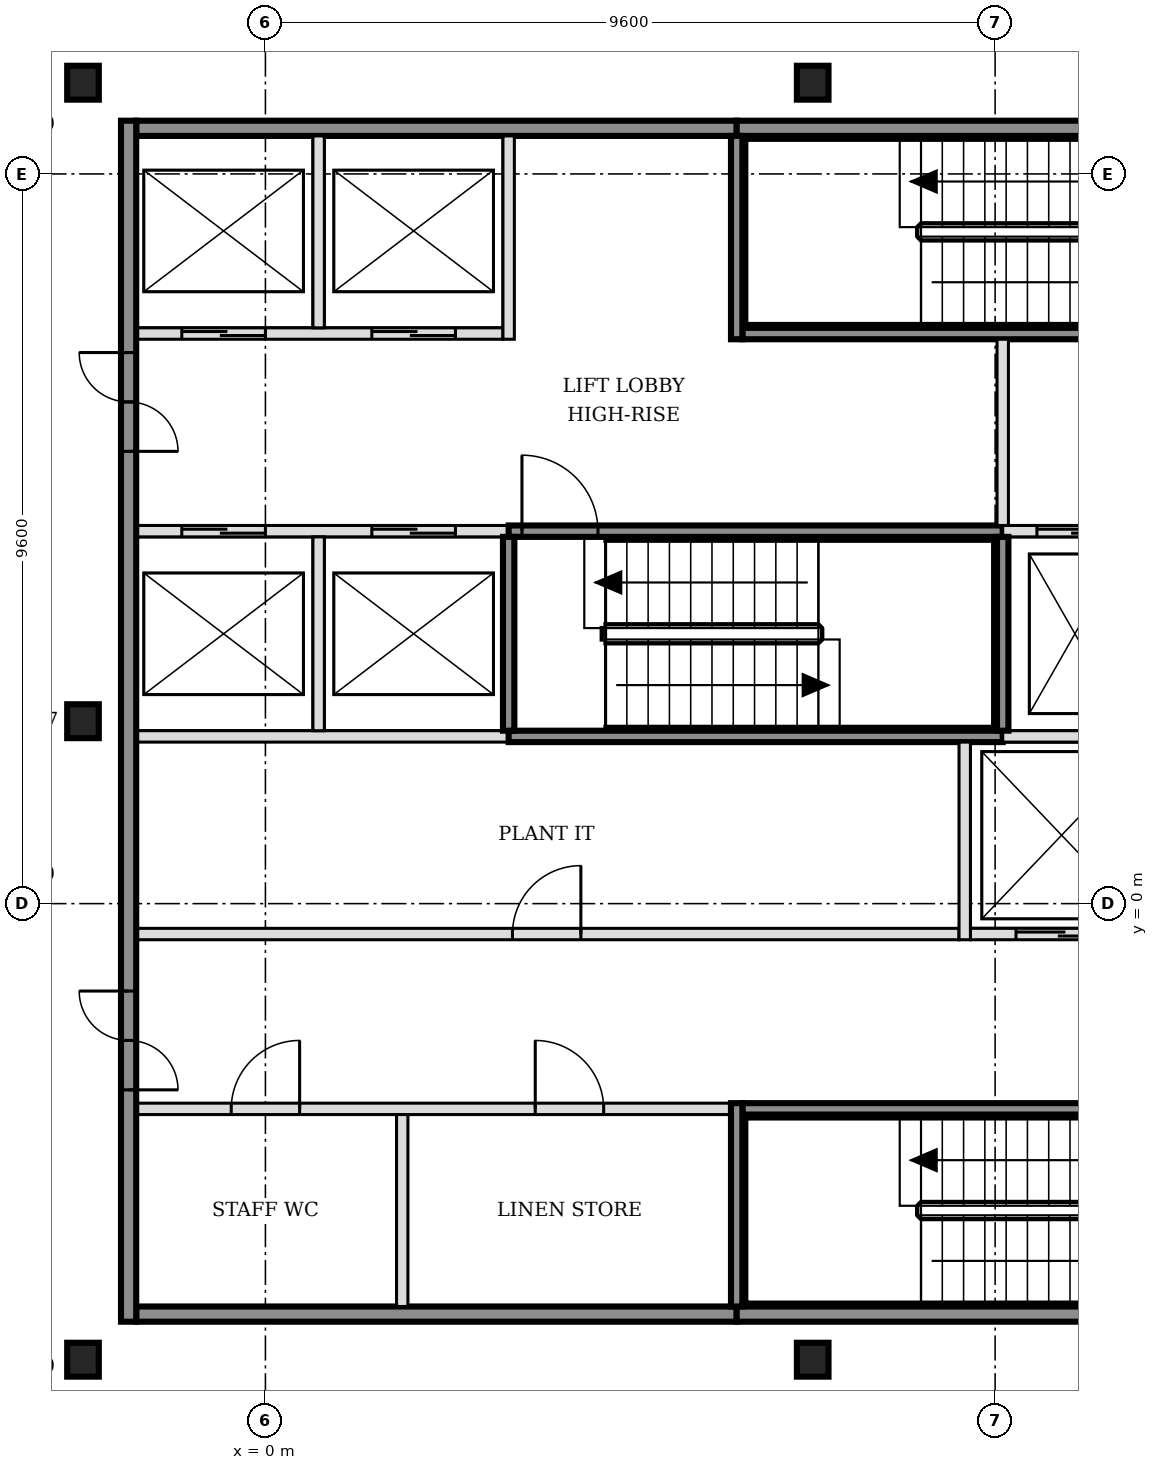
"""IFC4 building model, lengths in metres.
Left out: names, types, materials, properties, quantities, classifications, styles, units other than length and angle.
Written with IfcOpenShell. Run it as: python <this file> out.ifc"""

import sys

from ifc_helpers import new_model, si_unit, direction, frame, frame_2d, origin, origin_2d, place, context, subcontext, project, spatial, rectangle, i_section, extrude, element, fill, save


model = new_model("IFC4")
c1 = context("Model", 3, precision=1e-05, world=origin(), true_north=direction((0.0, 1.0)))
c2 = subcontext(c1, "Body", "Model", "MODEL_VIEW")
j1 = project(units=[si_unit("LENGTHUNIT", "METRE"), si_unit("PLANEANGLEUNIT", "RADIAN")], contexts=[c1])
p1 = place(None, origin())
s1 = spatial("IfcSite", under=j1, at=p1, CompositionType="ELEMENT")
p2 = place(p1, origin())
s2 = spatial("IfcBuilding", under=s1, at=p2, CompositionType="ELEMENT")
p3 = place(p2, frame((0.0, 0.0, 172.2)))
s3 = spatial("IfcBuildingStorey", under=s2, at=p3, CompositionType="ELEMENT", Elevation=172.2)
for number, where, z_axis, x_axis in (
    (1, (-2.4, -6.0, -0.15), (0.0, 0.0, 1.0), (1.0, 0.0, 0.0)),
    (2, (7.2, -6.0, -0.15), (0.0, 0.0, 1.0), (1.0, 0.0, 0.0)),
    (3, (-2.4, 2.4, -0.15), (0.0, 0.0, 1.0), (1.0, 0.0, 0.0)),
    (4, (-2.4, 10.8, -0.15), (0.0, 0.0, 1.0), (1.0, 0.0, 0.0)),
    (5, (7.2, 10.8, -0.15), (0.0, 0.0, 1.0), (1.0, 0.0, 0.0)),
):
    element("IfcColumn", number, at=place(p3, frame(where, z_axis=z_axis, x_axis=x_axis)), inside=s3, PredefinedType="COLUMN", context=c2, shape_type="SweptSolid", body=[
        extrude(i_section(OverallWidth=0.416, OverallDepth=0.446, WebThickness=0.039, FlangeThickness=0.063, FilletRadius=0.015, at=origin_2d()), origin(), (0.0, 0.0, 1.0), 3.6),
    ])
p4 = place(p3, frame((-1.7, -5.4, 0.0), z_axis=(0.0, 0.0, 1.0), x_axis=(1.0, 0.0, 0.0)))
e6 = element("IfcWall", 6, at=p4, inside=s3, PredefinedType="SOLIDWALL", context=c2, shape_type="SweptSolid", body=[
    extrude(rectangle(XDim=7.9, YDim=0.2, at=frame_2d((3.95, 0.0))), origin(), (0.0, 0.0, 1.0), 3.45),
])
p5 = place(p3, frame((6.2, -5.4, 0.0), z_axis=(0.0, 0.0, 1.0), x_axis=(1.0, 0.0, 0.0)))
e7 = element("IfcWall", 7, at=p5, inside=s3, PredefinedType="SOLIDWALL", context=c2, shape_type="SweptSolid", body=[
    extrude(rectangle(XDim=6.5, YDim=0.2, at=frame_2d((3.25, 0.0))), origin(), (0.0, 0.0, 1.0), 3.45),
])
p6 = place(p3, frame((-1.7, -2.7, 0.0), z_axis=(0.0, 0.0, 1.0), x_axis=(1.0, 0.0, 0.0)))
e8 = element("IfcWall", 8, at=p6, inside=s3, PredefinedType="PARTITIONING", context=c2, shape_type="SweptSolid", body=[
    extrude(rectangle(XDim=7.825, YDim=0.15, at=frame_2d((3.913, 0.0))), origin(), (0.0, 0.0, 1.0), 3.45),
])
p7 = place(p6, frame((1.25, 0.0, 0.0)))
e9 = element("IfcOpeningElement", 9, at=p7, cuts=e8, PredefinedType="OPENING", context=c2, shape_type="SweptSolid", body=[
    extrude(rectangle(XDim=0.9, YDim=2.1, at=frame_2d((0.45, 1.05))), frame((0.0, 0.085, 0.0), z_axis=(0.0, -1.0, 0.0), x_axis=(1.0, 0.0, 0.0)), (0.0, 0.0, 1.0), 0.17),
])
p8 = place(p6, frame((5.25, 0.0, 0.0)))
e10 = element("IfcOpeningElement", 10, at=p8, cuts=e8, PredefinedType="OPENING", context=c2, shape_type="SweptSolid", body=[
    extrude(rectangle(XDim=0.9, YDim=2.1, at=frame_2d((0.45, 1.05))), frame((0.0, 0.085, 0.0), z_axis=(0.0, -1.0, 0.0), x_axis=(1.0, 0.0, 0.0)), (0.0, 0.0, 1.0), 0.17),
])
p9 = place(p3, frame((6.275, -2.7, 0.0), z_axis=(0.0, 0.0, 1.0), x_axis=(1.0, 0.0, 0.0)))
e11 = element("IfcWall", 11, at=p9, inside=s3, PredefinedType="SOLIDWALL", context=c2, shape_type="SweptSolid", body=[
    extrude(rectangle(XDim=6.35, YDim=0.15, at=frame_2d((3.175, 0.0))), origin(), (0.0, 0.0, 1.0), 3.45),
])
p10 = place(p9, frame((5.225, 0.0, 0.0)))
e12 = element("IfcOpeningElement", 12, at=p10, cuts=e11, PredefinedType="OPENING", context=c2, shape_type="SweptSolid", body=[
    extrude(rectangle(XDim=1.0, YDim=2.1, at=frame_2d((0.5, 1.05))), frame((0.0, 0.085, 0.0), z_axis=(0.0, -1.0, 0.0), x_axis=(1.0, 0.0, 0.0)), (0.0, 0.0, 1.0), 0.17),
])
p11 = place(p3, frame((-1.7, -0.4, 0.0), z_axis=(0.0, 0.0, 1.0), x_axis=(1.0, 0.0, 0.0)))
e13 = element("IfcWall", 13, at=p11, inside=s3, PredefinedType="PARTITIONING", context=c2, shape_type="SweptSolid", body=[
    extrude(rectangle(XDim=10.825, YDim=0.15, at=frame_2d((5.413, 0.0))), origin(), (0.0, 0.0, 1.0), 3.45),
])
p12 = place(p11, frame((4.95, 0.0, 0.0)))
e14 = element("IfcOpeningElement", 14, at=p12, cuts=e13, PredefinedType="OPENING", context=c2, shape_type="SweptSolid", body=[
    extrude(rectangle(XDim=0.9, YDim=2.1, at=frame_2d((0.45, 1.05))), frame((0.0, 0.085, 0.0), z_axis=(0.0, -1.0, 0.0), x_axis=(1.0, 0.0, 0.0)), (0.0, 0.0, 1.0), 0.17),
])
p13 = place(p3, frame((9.275, -0.4, 0.0), z_axis=(0.0, 0.0, 1.0), x_axis=(1.0, 0.0, 0.0)))
e15 = element("IfcWall", 15, at=p13, inside=s3, PredefinedType="SOLIDWALL", context=c2, shape_type="SweptSolid", body=[
    extrude(rectangle(XDim=4.95, YDim=0.15, at=frame_2d((2.475, 0.0))), origin(), (0.0, 0.0, 1.0), 3.45),
])
p14 = place(p13, frame((0.6, 0.0, 0.0)))
e16 = element("IfcOpeningElement", 16, at=p14, cuts=e15, PredefinedType="OPENING", context=c2, shape_type="SweptSolid", body=[
    extrude(rectangle(XDim=1.2, YDim=2.1, at=frame_2d((0.6, 1.05))), frame((0.0, 0.085, 0.0), z_axis=(0.0, -1.0, 0.0), x_axis=(1.0, 0.0, 0.0)), (0.0, 0.0, 1.0), 0.17),
])
p15 = place(p13, frame((3.15, 0.0, 0.0)))
e17 = element("IfcOpeningElement", 17, at=p15, cuts=e15, PredefinedType="OPENING", context=c2, shape_type="SweptSolid", body=[
    extrude(rectangle(XDim=1.2, YDim=2.1, at=frame_2d((0.6, 1.05))), frame((0.0, 0.085, 0.0), z_axis=(0.0, -1.0, 0.0), x_axis=(1.0, 0.0, 0.0)), (0.0, 0.0, 1.0), 0.17),
])
p16 = place(p3, frame((-1.7, 2.2, 0.0), z_axis=(0.0, 0.0, 1.0), x_axis=(1.0, 0.0, 0.0)))
e18 = element("IfcWall", 18, at=p16, inside=s3, PredefinedType="SOLIDWALL", context=c2, shape_type="SweptSolid", body=[
    extrude(rectangle(XDim=4.9, YDim=0.15, at=frame_2d((2.45, 0.0))), origin(), (0.0, 0.0, 1.0), 3.45),
])
p17 = place(p3, frame((3.2, 2.2, 0.0), z_axis=(0.0, 0.0, 1.0), x_axis=(1.0, 0.0, 0.0)))
e19 = element("IfcWall", 19, at=p17, inside=s3, PredefinedType="SOLIDWALL", context=c2, shape_type="SweptSolid", body=[
    extrude(rectangle(XDim=6.5, YDim=0.15, at=frame_2d((3.25, 0.0))), origin(), (0.0, 0.0, 1.0), 3.45),
])
p18 = place(p3, frame((9.7, 2.2, 0.0), z_axis=(0.0, 0.0, 1.0), x_axis=(1.0, 0.0, 0.0)))
e20 = element("IfcWall", 20, at=p18, inside=s3, PredefinedType="SOLIDWALL", context=c2, shape_type="SweptSolid", body=[
    extrude(rectangle(XDim=4.525, YDim=0.15, at=frame_2d((2.263, 0.0))), origin(), (0.0, 0.0, 1.0), 3.45),
])
p19 = place(p3, frame((-1.7, 4.9, 0.0), z_axis=(0.0, 0.0, 1.0), x_axis=(1.0, 0.0, 0.0)))
e21 = element("IfcWall", 21, at=p19, inside=s3, PredefinedType="SOLIDWALL", context=c2, shape_type="SweptSolid", body=[
    extrude(rectangle(XDim=4.9, YDim=0.15, at=frame_2d((2.45, 0.0))), origin(), (0.0, 0.0, 1.0), 3.45),
])
p20 = place(p19, frame((0.6, 0.0, 0.0)))
e22 = element("IfcOpeningElement", 22, at=p20, cuts=e21, PredefinedType="OPENING", context=c2, shape_type="SweptSolid", body=[
    extrude(rectangle(XDim=1.1, YDim=2.1, at=frame_2d((0.55, 1.05))), frame((0.0, 0.085, 0.0), z_axis=(0.0, -1.0, 0.0), x_axis=(1.0, 0.0, 0.0)), (0.0, 0.0, 1.0), 0.17),
])
p21 = place(p19, frame((3.1, 0.0, 0.0)))
e23 = element("IfcOpeningElement", 23, at=p21, cuts=e21, PredefinedType="OPENING", context=c2, shape_type="SweptSolid", body=[
    extrude(rectangle(XDim=1.1, YDim=2.1, at=frame_2d((0.55, 1.05))), frame((0.0, 0.085, 0.0), z_axis=(0.0, -1.0, 0.0), x_axis=(1.0, 0.0, 0.0)), (0.0, 0.0, 1.0), 0.17),
])
p22 = place(p3, frame((3.2, 4.9, 0.0), z_axis=(0.0, 0.0, 1.0), x_axis=(1.0, 0.0, 0.0)))
e24 = element("IfcWall", 24, at=p22, inside=s3, PredefinedType="SOLIDWALL", context=c2, shape_type="SweptSolid", body=[
    extrude(rectangle(XDim=6.5, YDim=0.15, at=frame_2d((3.25, 0.0))), origin(), (0.0, 0.0, 1.0), 3.45),
])
p23 = place(p22, frame((0.175, 0.0, 0.0)))
e25 = element("IfcOpeningElement", 25, at=p23, cuts=e24, PredefinedType="OPENING", context=c2, shape_type="SweptSolid", body=[
    extrude(rectangle(XDim=1.0, YDim=2.1, at=frame_2d((0.5, 1.05))), frame((0.0, 0.085, 0.0), z_axis=(0.0, -1.0, 0.0), x_axis=(1.0, 0.0, 0.0)), (0.0, 0.0, 1.0), 0.17),
])
p24 = place(p3, frame((9.7, 4.9, 0.0), z_axis=(0.0, 0.0, 1.0), x_axis=(1.0, 0.0, 0.0)))
e26 = element("IfcWall", 26, at=p24, inside=s3, PredefinedType="SOLIDWALL", context=c2, shape_type="SweptSolid", body=[
    extrude(rectangle(XDim=6.4, YDim=0.15, at=frame_2d((3.2, 0.0))), origin(), (0.0, 0.0, 1.0), 3.45),
])
p25 = place(p24, frame((0.45, 0.0, 0.0)))
e27 = element("IfcOpeningElement", 27, at=p25, cuts=e26, PredefinedType="OPENING", context=c2, shape_type="SweptSolid", body=[
    extrude(rectangle(XDim=1.0, YDim=2.1, at=frame_2d((0.5, 1.05))), frame((0.0, 0.085, 0.0), z_axis=(0.0, -1.0, 0.0), x_axis=(1.0, 0.0, 0.0)), (0.0, 0.0, 1.0), 0.17),
])
p26 = place(p24, frame((2.35, 0.0, 0.0)))
e28 = element("IfcOpeningElement", 28, at=p26, cuts=e26, PredefinedType="OPENING", context=c2, shape_type="SweptSolid", body=[
    extrude(rectangle(XDim=1.0, YDim=2.1, at=frame_2d((0.5, 1.05))), frame((0.0, 0.085, 0.0), z_axis=(0.0, -1.0, 0.0), x_axis=(1.0, 0.0, 0.0)), (0.0, 0.0, 1.0), 0.17),
])
p27 = place(p24, frame((4.7, 0.0, 0.0)))
e29 = element("IfcOpeningElement", 29, at=p27, cuts=e26, PredefinedType="OPENING", context=c2, shape_type="SweptSolid", body=[
    extrude(rectangle(XDim=0.9, YDim=2.1, at=frame_2d((0.45, 1.05))), frame((0.0, 0.085, 0.0), z_axis=(0.0, -1.0, 0.0), x_axis=(1.0, 0.0, 0.0)), (0.0, 0.0, 1.0), 0.17),
])
p28 = place(p3, frame((-1.7, 7.5, 0.0), z_axis=(0.0, 0.0, 1.0), x_axis=(1.0, 0.0, 0.0)))
e30 = element("IfcWall", 30, at=p28, inside=s3, PredefinedType="SOLIDWALL", context=c2, shape_type="SweptSolid", body=[
    extrude(rectangle(XDim=4.825, YDim=0.15, at=frame_2d((2.413, 0.0))), origin(), (0.0, 0.0, 1.0), 3.45),
])
p29 = place(p28, frame((0.6, 0.0, 0.0)))
e31 = element("IfcOpeningElement", 31, at=p29, cuts=e30, PredefinedType="OPENING", context=c2, shape_type="SweptSolid", body=[
    extrude(rectangle(XDim=1.1, YDim=2.1, at=frame_2d((0.55, 1.05))), frame((0.0, 0.085, 0.0), z_axis=(0.0, -1.0, 0.0), x_axis=(1.0, 0.0, 0.0)), (0.0, 0.0, 1.0), 0.17),
])
p30 = place(p28, frame((3.1, 0.0, 0.0)))
e32 = element("IfcOpeningElement", 32, at=p30, cuts=e30, PredefinedType="OPENING", context=c2, shape_type="SweptSolid", body=[
    extrude(rectangle(XDim=1.1, YDim=2.1, at=frame_2d((0.55, 1.05))), frame((0.0, 0.085, 0.0), z_axis=(0.0, -1.0, 0.0), x_axis=(1.0, 0.0, 0.0)), (0.0, 0.0, 1.0), 0.17),
])
p31 = place(p3, frame((6.275, 7.5, 0.0), z_axis=(0.0, 0.0, 1.0), x_axis=(1.0, 0.0, 0.0)))
e33 = element("IfcWall", 33, at=p31, inside=s3, PredefinedType="SOLIDWALL", context=c2, shape_type="SweptSolid", body=[
    extrude(rectangle(XDim=6.425, YDim=0.15, at=frame_2d((3.212, 0.0))), origin(), (0.0, 0.0, 1.0), 3.45),
])
p32 = place(p31, frame((5.225, 0.0, 0.0)))
e34 = element("IfcOpeningElement", 34, at=p32, cuts=e33, PredefinedType="OPENING", context=c2, shape_type="SweptSolid", body=[
    extrude(rectangle(XDim=1.0, YDim=2.1, at=frame_2d((0.5, 1.05))), frame((0.0, 0.085, 0.0), z_axis=(0.0, -1.0, 0.0), x_axis=(1.0, 0.0, 0.0)), (0.0, 0.0, 1.0), 0.17),
])
p33 = place(p3, frame((-1.7, 10.2, 0.0), z_axis=(0.0, 0.0, 1.0), x_axis=(1.0, 0.0, 0.0)))
e35 = element("IfcWall", 35, at=p33, inside=s3, PredefinedType="SOLIDWALL", context=c2, shape_type="SweptSolid", body=[
    extrude(rectangle(XDim=7.9, YDim=0.2, at=frame_2d((3.95, 0.0))), origin(), (0.0, 0.0, 1.0), 3.45),
])
p34 = place(p3, frame((6.2, 10.2, 0.0), z_axis=(0.0, 0.0, 1.0), x_axis=(1.0, 0.0, 0.0)))
e36 = element("IfcWall", 36, at=p34, inside=s3, PredefinedType="SOLIDWALL", context=c2, shape_type="SweptSolid", body=[
    extrude(rectangle(XDim=6.5, YDim=0.2, at=frame_2d((3.25, 0.0))), origin(), (0.0, 0.0, 1.0), 3.45),
])
p35 = place(p3, frame((-1.8, -5.5, 0.0), z_axis=(0.0, 0.0, 1.0), x_axis=(0.0, 1.0, 0.0)))
e37 = element("IfcWall", 37, at=p35, inside=s3, PredefinedType="SOLIDWALL", context=c2, shape_type="SweptSolid", body=[
    extrude(rectangle(XDim=15.8, YDim=0.2, at=frame_2d((7.9, 0.0))), origin(), (0.0, 0.0, 1.0), 3.45),
])
p36 = place(p35, frame((3.05, 0.0, 0.0)))
e38 = element("IfcOpeningElement", 38, at=p36, cuts=e37, PredefinedType="OPENING", context=c2, shape_type="SweptSolid", body=[
    extrude(rectangle(XDim=1.3, YDim=2.1, at=frame_2d((0.65, 1.05))), frame((0.0, 0.11, 0.0), z_axis=(0.0, -1.0, 0.0), x_axis=(1.0, 0.0, 0.0)), (0.0, 0.0, 1.0), 0.22),
])
p37 = place(p35, frame((11.45, 0.0, 0.0)))
e39 = element("IfcOpeningElement", 39, at=p37, cuts=e37, PredefinedType="OPENING", context=c2, shape_type="SweptSolid", body=[
    extrude(rectangle(XDim=1.3, YDim=2.1, at=frame_2d((0.65, 1.05))), frame((0.0, 0.11, 0.0), z_axis=(0.0, -1.0, 0.0), x_axis=(1.0, 0.0, 0.0)), (0.0, 0.0, 1.0), 0.22),
])
p38 = place(p3, frame((0.7, 2.275, 0.0), z_axis=(0.0, 0.0, 1.0), x_axis=(0.0, 1.0, 0.0)))
e40 = element("IfcWall", 40, at=p38, inside=s3, PredefinedType="SOLIDWALL", context=c2, shape_type="SweptSolid", body=[
    extrude(rectangle(XDim=2.55, YDim=0.15, at=frame_2d((1.275, 0.0))), origin(), (0.0, 0.0, 1.0), 3.45),
])
p39 = place(p3, frame((0.7, 7.575, 0.0), z_axis=(0.0, 0.0, 1.0), x_axis=(0.0, 1.0, 0.0)))
e41 = element("IfcWall", 41, at=p39, inside=s3, PredefinedType="SOLIDWALL", context=c2, shape_type="SweptSolid", body=[
    extrude(rectangle(XDim=2.525, YDim=0.15, at=frame_2d((1.263, 0.0))), origin(), (0.0, 0.0, 1.0), 3.45),
])
p40 = place(p3, frame((1.8, -5.3, 0.0), z_axis=(0.0, 0.0, 1.0), x_axis=(0.0, 1.0, 0.0)))
e42 = element("IfcWall", 42, at=p40, inside=s3, PredefinedType="PARTITIONING", context=c2, shape_type="SweptSolid", body=[
    extrude(rectangle(XDim=2.525, YDim=0.15, at=frame_2d((1.263, 0.0))), origin(), (0.0, 0.0, 1.0), 3.45),
])
p41 = place(p3, frame((3.2, 2.275, 0.0), z_axis=(0.0, 0.0, 1.0), x_axis=(0.0, 1.0, 0.0)))
e43 = element("IfcWall", 43, at=p41, inside=s3, PredefinedType="SOLIDWALL", context=c2, shape_type="SweptSolid", body=[
    extrude(rectangle(XDim=2.55, YDim=0.15, at=frame_2d((1.275, 0.0))), origin(), (0.0, 0.0, 1.0), 3.45),
])
for number, where, z_axis, x_axis in (
    (44, (3.2, 7.425, 0.0), (0.0, 0.0, 1.0), (0.0, 1.0, 0.0)),
    (45, (6.2, -5.3, 0.0), (0.0, 0.0, 1.0), (0.0, 1.0, 0.0)),
    (46, (6.2, 7.425, 0.0), (0.0, 0.0, 1.0), (0.0, 1.0, 0.0)),
):
    element("IfcWall", number, at=place(p3, frame(where, z_axis=z_axis, x_axis=x_axis)), inside=s3, PredefinedType="SOLIDWALL", context=c2, shape_type="SweptSolid", body=[
        extrude(rectangle(XDim=2.675, YDim=0.15, at=frame_2d((1.337, 0.0))), origin(), (0.0, 0.0, 1.0), 3.45),
    ])
p42 = place(p3, frame((9.2, -0.475, 0.0), z_axis=(0.0, 0.0, 1.0), x_axis=(0.0, 1.0, 0.0)))
e47 = element("IfcWall", 47, at=p42, inside=s3, PredefinedType="SOLIDWALL", context=c2, shape_type="SweptSolid", body=[
    extrude(rectangle(XDim=2.6, YDim=0.15, at=frame_2d((1.3, 0.0))), origin(), (0.0, 0.0, 1.0), 3.45),
])
p43 = place(p3, frame((9.7, 2.275, 0.0), z_axis=(0.0, 0.0, 1.0), x_axis=(0.0, 1.0, 0.0)))
e48 = element("IfcWall", 48, at=p43, inside=s3, PredefinedType="SOLIDWALL", context=c2, shape_type="SweptSolid", body=[
    extrude(rectangle(XDim=2.55, YDim=0.15, at=frame_2d((1.275, 0.0))), origin(), (0.0, 0.0, 1.0), 3.45),
])
p44 = place(p3, frame((9.7, 4.975, 0.0), z_axis=(0.0, 0.0, 1.0), x_axis=(0.0, 1.0, 0.0)))
e49 = element("IfcWall", 49, at=p44, inside=s3, PredefinedType="SOLIDWALL", context=c2, shape_type="SweptSolid", body=[
    extrude(rectangle(XDim=2.45, YDim=0.15, at=frame_2d((1.225, 0.0))), origin(), (0.0, 0.0, 1.0), 3.45),
])
p45 = place(p14, origin())
e50 = element("IfcDoor", 50, at=p45, inside=s3, OperationType="DOUBLE_DOOR_SLIDING", PredefinedType="DOOR", context=c2, shape_type="SweptSolid", body=[
    extrude(rectangle(XDim=1.2, YDim=2.1, at=frame_2d((0.6, 1.05))), frame((0.0, 0.025, 0.0), z_axis=(0.0, -1.0, 0.0), x_axis=(1.0, 0.0, 0.0)), (0.0, 0.0, 1.0), 0.05),
])
fill(e16, e50)
p46 = place(p20, origin())
e51 = element("IfcDoor", 51, at=p46, inside=s3, OperationType="DOUBLE_DOOR_SLIDING", PredefinedType="DOOR", context=c2, shape_type="SweptSolid", body=[
    extrude(rectangle(XDim=1.1, YDim=2.1, at=frame_2d((0.55, 1.05))), frame((0.0, 0.025, 0.0), z_axis=(0.0, -1.0, 0.0), x_axis=(1.0, 0.0, 0.0)), (0.0, 0.0, 1.0), 0.05),
])
fill(e22, e51)
p47 = place(p21, origin())
e52 = element("IfcDoor", 52, at=p47, inside=s3, OperationType="DOUBLE_DOOR_SLIDING", PredefinedType="DOOR", context=c2, shape_type="SweptSolid", body=[
    extrude(rectangle(XDim=1.1, YDim=2.1, at=frame_2d((0.55, 1.05))), frame((0.0, 0.025, 0.0), z_axis=(0.0, -1.0, 0.0), x_axis=(1.0, 0.0, 0.0)), (0.0, 0.0, 1.0), 0.05),
])
fill(e23, e52)
p48 = place(p29, origin())
e53 = element("IfcDoor", 53, at=p48, inside=s3, OperationType="DOUBLE_DOOR_SLIDING", PredefinedType="DOOR", context=c2, shape_type="SweptSolid", body=[
    extrude(rectangle(XDim=1.1, YDim=2.1, at=frame_2d((0.55, 1.05))), frame((0.0, 0.025, 0.0), z_axis=(0.0, -1.0, 0.0), x_axis=(1.0, 0.0, 0.0)), (0.0, 0.0, 1.0), 0.05),
])
fill(e31, e53)
p49 = place(p30, origin())
e54 = element("IfcDoor", 54, at=p49, inside=s3, OperationType="DOUBLE_DOOR_SLIDING", PredefinedType="DOOR", context=c2, shape_type="SweptSolid", body=[
    extrude(rectangle(XDim=1.1, YDim=2.1, at=frame_2d((0.55, 1.05))), frame((0.0, 0.025, 0.0), z_axis=(0.0, -1.0, 0.0), x_axis=(1.0, 0.0, 0.0)), (0.0, 0.0, 1.0), 0.05),
])
fill(e32, e54)
p50 = place(p25, origin())
e55 = element("IfcDoor", 55, at=p50, inside=s3, OperationType="DOUBLE_DOOR_SLIDING", PredefinedType="DOOR", context=c2, shape_type="SweptSolid", body=[
    extrude(rectangle(XDim=1.0, YDim=2.1, at=frame_2d((0.5, 1.05))), frame((0.0, 0.025, 0.0), z_axis=(0.0, -1.0, 0.0), x_axis=(1.0, 0.0, 0.0)), (0.0, 0.0, 1.0), 0.05),
])
fill(e27, e55)
p51 = place(p23, origin())
e56 = element("IfcDoor", 56, at=p51, inside=s3, OperationType="SINGLE_SWING_LEFT", PredefinedType="DOOR", context=c2, shape_type="SweptSolid", body=[
    extrude(rectangle(XDim=1.0, YDim=2.1, at=frame_2d((0.5, 1.05))), frame((0.0, 0.025, 0.0), z_axis=(0.0, -1.0, 0.0), x_axis=(1.0, 0.0, 0.0)), (0.0, 0.0, 1.0), 0.05),
])
fill(e25, e56)
p52 = place(p36, origin())
e57 = element("IfcDoor", 57, at=p52, inside=s3, OperationType="DOUBLE_DOOR_SINGLE_SWING", PredefinedType="DOOR", context=c2, shape_type="SweptSolid", body=[
    extrude(rectangle(XDim=1.3, YDim=2.1, at=frame_2d((0.65, 1.05))), frame((0.0, 0.025, 0.0), z_axis=(0.0, -1.0, 0.0), x_axis=(1.0, 0.0, 0.0)), (0.0, 0.0, 1.0), 0.05),
])
fill(e38, e57)
p53 = place(p37, origin())
e58 = element("IfcDoor", 58, at=p53, inside=s3, OperationType="DOUBLE_DOOR_SINGLE_SWING", PredefinedType="DOOR", context=c2, shape_type="SweptSolid", body=[
    extrude(rectangle(XDim=1.3, YDim=2.1, at=frame_2d((0.65, 1.05))), frame((0.0, 0.025, 0.0), z_axis=(0.0, -1.0, 0.0), x_axis=(1.0, 0.0, 0.0)), (0.0, 0.0, 1.0), 0.05),
])
fill(e39, e58)
p54 = place(p7, origin())
e59 = element("IfcDoor", 59, at=p54, inside=s3, OperationType="SINGLE_SWING_RIGHT", PredefinedType="DOOR", context=c2, shape_type="SweptSolid", body=[
    extrude(rectangle(XDim=0.9, YDim=2.1, at=frame_2d((0.45, 1.05))), frame((0.0, 0.025, 0.0), z_axis=(0.0, -1.0, 0.0), x_axis=(1.0, 0.0, 0.0)), (0.0, 0.0, 1.0), 0.05),
])
fill(e9, e59)
p55 = place(p8, origin())
e60 = element("IfcDoor", 60, at=p55, inside=s3, OperationType="SINGLE_SWING_LEFT", PredefinedType="DOOR", context=c2, shape_type="SweptSolid", body=[
    extrude(rectangle(XDim=0.9, YDim=2.1, at=frame_2d((0.45, 1.05))), frame((0.0, 0.025, 0.0), z_axis=(0.0, -1.0, 0.0), x_axis=(1.0, 0.0, 0.0)), (0.0, 0.0, 1.0), 0.05),
])
fill(e10, e60)
p56 = place(p12, origin())
e61 = element("IfcDoor", 61, at=p56, inside=s3, OperationType="SINGLE_SWING_RIGHT", PredefinedType="DOOR", context=c2, shape_type="SweptSolid", body=[
    extrude(rectangle(XDim=0.9, YDim=2.1, at=frame_2d((0.45, 1.05))), frame((0.0, 0.025, 0.0), z_axis=(0.0, -1.0, 0.0), x_axis=(1.0, 0.0, 0.0)), (0.0, 0.0, 1.0), 0.05),
])
fill(e14, e61)
save(model, sys.argv[1])
